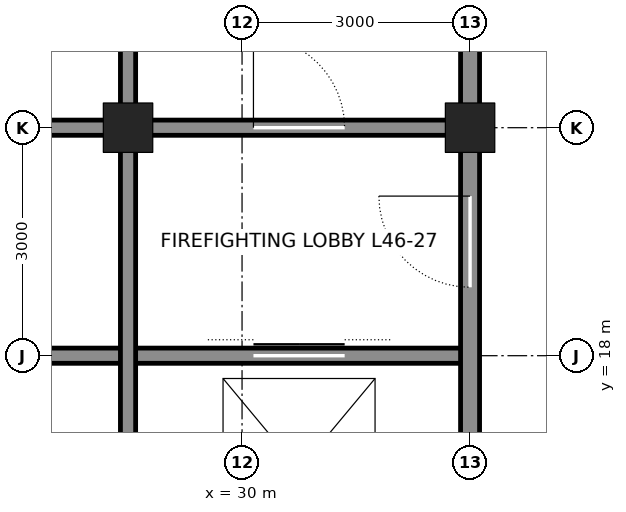
"""IFC4 building model, lengths in metres.
Left out: names, types, materials, properties, quantities, classifications, styles, units other than length and angle.
Written with IfcOpenShell. Run it as: python <this file> out.ifc"""

import sys

from ifc_helpers import new_model, si_unit, direction, frame, frame_2d, origin, origin_2d, place, context, subcontext, project, spatial, rectangle, hollow_rectangle, extrude, element, fill, save


model = new_model("IFC4")
c1 = context("Model", 3, precision=1e-05, world=origin(), true_north=direction((0.0, 1.0)))
c2 = subcontext(c1, "Body", "Model", "MODEL_VIEW")
j1 = project(units=[si_unit("LENGTHUNIT", "METRE"), si_unit("PLANEANGLEUNIT", "RADIAN")], contexts=[c1])
p1 = place(None, origin())
s1 = spatial("IfcSite", under=j1, at=p1, CompositionType="ELEMENT")
p2 = place(p1, origin())
s2 = spatial("IfcBuilding", under=s1, at=p2, CompositionType="ELEMENT")
p3 = place(p2, frame((0.0, 0.0, 209.7)))
s3 = spatial("IfcBuildingStorey", under=s2, at=p3, CompositionType="ELEMENT", Elevation=209.7)
for number, where, z_axis, x_axis in (
    (1, (33.0, 21.0, 0.0), (0.0, 0.0, 1.0), (1.0, 0.0, 0.0)),
    (2, (28.5, 21.0, 0.0), (0.0, 0.0, 1.0), (1.0, 0.0, 0.0)),
):
    element("IfcColumn", number, at=place(p3, frame(where, z_axis=z_axis, x_axis=x_axis)), inside=s3, PredefinedType="COLUMN", context=c2, shape_type="SweptSolid", body=[
        extrude(hollow_rectangle(XDim=0.65, YDim=0.65, WallThickness=0.065, at=origin_2d()), origin(), (0.0, 0.0, 1.0), 4.2),
    ])
p4 = place(p3, frame((25.5, 18.0, 0.0), z_axis=(0.0, 0.0, 1.0), x_axis=(1.0, 0.0, 0.0)))
e3 = element("IfcWall", 3, at=p4, inside=s3, PredefinedType="SOLIDWALL", context=c2, shape_type="SweptSolid", body=[
    extrude(rectangle(XDim=7.5, YDim=0.2, at=frame_2d((3.75, 0.0))), origin(), (0.0, 0.0, 1.0), 4.04),
])
p5 = place(p4, frame((4.65, 0.0, 0.0)))
e4 = element("IfcOpeningElement", 4, at=p5, cuts=e3, PredefinedType="OPENING", context=c2, shape_type="SweptSolid", body=[
    extrude(rectangle(XDim=1.2, YDim=2.1, at=frame_2d((0.6, 1.05))), frame((0.0, 0.11, 0.0), z_axis=(0.0, -1.0, 0.0), x_axis=(1.0, 0.0, 0.0)), (0.0, 0.0, 1.0), 0.22),
])
p6 = place(p3, frame((25.5, 21.0, 0.0), z_axis=(0.0, 0.0, 1.0), x_axis=(1.0, 0.0, 0.0)))
e5 = element("IfcWall", 5, at=p6, inside=s3, PredefinedType="SOLIDWALL", context=c2, shape_type="SweptSolid", body=[
    extrude(rectangle(XDim=2.75, YDim=0.2, at=frame_2d((1.375, 0.0))), origin(), (0.0, 0.0, 1.0), 3.09),
])
p7 = place(p3, frame((28.75, 21.0, 0.0), z_axis=(0.0, 0.0, 1.0), x_axis=(1.0, 0.0, 0.0)))
e6 = element("IfcWall", 6, at=p7, inside=s3, PredefinedType="SOLIDWALL", context=c2, shape_type="SweptSolid", body=[
    extrude(rectangle(XDim=4.0, YDim=0.2, at=frame_2d((2.0, 0.0))), origin(), (0.0, 0.0, 1.0), 3.09),
])
p8 = place(p7, frame((1.4, 0.0, 0.0)))
e7 = element("IfcOpeningElement", 7, at=p8, cuts=e6, PredefinedType="OPENING", context=c2, shape_type="SweptSolid", body=[
    extrude(rectangle(XDim=1.2, YDim=2.1, at=frame_2d((0.6, 1.05))), frame((0.0, 0.11, 0.0), z_axis=(0.0, -1.0, 0.0), x_axis=(1.0, 0.0, 0.0)), (0.0, 0.0, 1.0), 0.22),
])
p9 = place(p3, frame((28.5, 12.25, 0.0), z_axis=(0.0, 0.0, 1.0), x_axis=(0.0, 1.0, 0.0)))
e8 = element("IfcWall", 8, at=p9, inside=s3, PredefinedType="SOLIDWALL", context=c2, shape_type="SweptSolid", body=[
    extrude(rectangle(XDim=8.5, YDim=0.2, at=frame_2d((4.25, 0.0))), origin(), (0.0, 0.0, 1.0), 3.113),
])
p10 = place(p3, frame((28.5, 21.25, 0.0), z_axis=(0.0, 0.0, 1.0), x_axis=(0.0, 1.0, 0.0)))
e9 = element("IfcWall", 9, at=p10, inside=s3, PredefinedType="SOLIDWALL", context=c2, shape_type="SweptSolid", body=[
    extrude(rectangle(XDim=2.5, YDim=0.2, at=frame_2d((1.25, 0.0))), origin(), (0.0, 0.0, 1.0), 3.113),
])
p11 = place(p3, frame((33.0, 12.25, 0.0), z_axis=(0.0, 0.0, 1.0), x_axis=(0.0, 1.0, 0.0)))
e10 = element("IfcWall", 10, at=p11, inside=s3, PredefinedType="SOLIDWALL", context=c2, shape_type="SweptSolid", body=[
    extrude(rectangle(XDim=8.5, YDim=0.25, at=frame_2d((4.25, 0.0))), origin(), (0.0, 0.0, 1.0), 3.113),
])
p12 = place(p11, frame((6.65, 0.0, 0.0)))
e11 = element("IfcOpeningElement", 11, at=p12, cuts=e10, PredefinedType="OPENING", context=c2, shape_type="SweptSolid", body=[
    extrude(rectangle(XDim=1.2, YDim=2.1, at=frame_2d((0.6, 1.05))), frame((0.0, 0.135, 0.0), z_axis=(0.0, -1.0, 0.0), x_axis=(1.0, 0.0, 0.0)), (0.0, 0.0, 1.0), 0.27),
])
p13 = place(p11, frame((0.875, 0.0, 0.0)))
e12 = element("IfcOpeningElement", 12, at=p13, cuts=e10, PredefinedType="OPENING", context=c2, shape_type="SweptSolid", body=[
    extrude(rectangle(XDim=0.75, YDim=2.1, at=frame_2d((0.375, 1.05))), frame((0.0, 0.135, 0.0), z_axis=(0.0, -1.0, 0.0), x_axis=(1.0, 0.0, 0.0)), (0.0, 0.0, 1.0), 0.27),
])
p14 = place(p3, frame((33.0, 21.25, 0.0), z_axis=(0.0, 0.0, 1.0), x_axis=(0.0, 1.0, 0.0)))
e13 = element("IfcWall", 13, at=p14, inside=s3, PredefinedType="SOLIDWALL", context=c2, shape_type="SweptSolid", body=[
    extrude(rectangle(XDim=2.5, YDim=0.25, at=frame_2d((1.25, 0.0))), origin(), (0.0, 0.0, 1.0), 3.113),
])
p15 = place(p8, origin())
e14 = element("IfcDoor", 14, at=p15, inside=s3, OperationType="SINGLE_SWING_LEFT", PredefinedType="DOOR", context=c2, shape_type="SweptSolid", body=[
    extrude(rectangle(XDim=1.2, YDim=2.1, at=frame_2d((0.6, 1.05))), frame((0.0, 0.025, 0.0), z_axis=(0.0, -1.0, 0.0), x_axis=(1.0, 0.0, 0.0)), (0.0, 0.0, 1.0), 0.05),
])
fill(e7, e14)
p16 = place(p12, origin())
e15 = element("IfcDoor", 15, at=p16, inside=s3, OperationType="SINGLE_SWING_RIGHT", PredefinedType="DOOR", context=c2, shape_type="SweptSolid", body=[
    extrude(rectangle(XDim=1.2, YDim=2.1, at=frame_2d((0.6, 1.05))), frame((0.0, 0.025, 0.0), z_axis=(0.0, -1.0, 0.0), x_axis=(1.0, 0.0, 0.0)), (0.0, 0.0, 1.0), 0.05),
])
fill(e11, e15)
p17 = place(p5, origin())
e16 = element("IfcDoor", 16, at=p17, inside=s3, OperationType="DOUBLE_DOOR_SLIDING", PredefinedType="DOOR", context=c2, shape_type="SweptSolid", body=[
    extrude(rectangle(XDim=1.2, YDim=2.1, at=frame_2d((0.6, 1.05))), frame((0.0, 0.025, 0.0), z_axis=(0.0, -1.0, 0.0), x_axis=(1.0, 0.0, 0.0)), (0.0, 0.0, 1.0), 0.05),
])
fill(e4, e16)
save(model, sys.argv[1])
